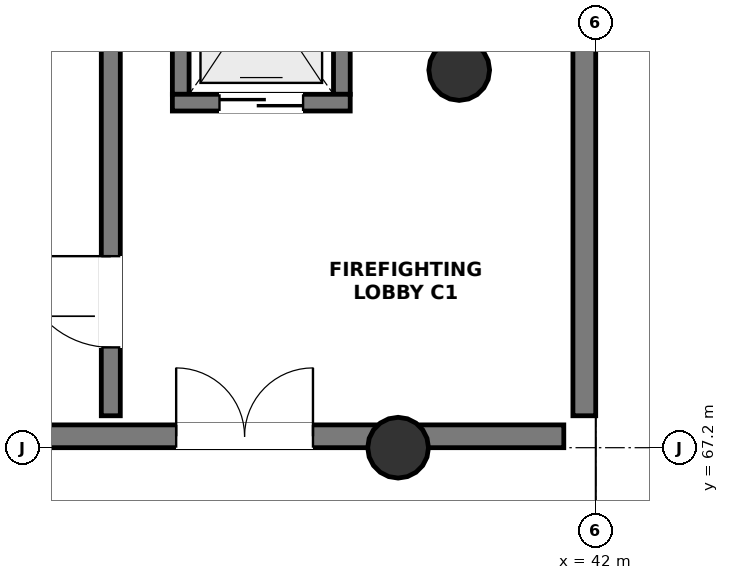
"""IFC4 building model, lengths in metres.
Left out: names, types, materials, properties, quantities, classifications, styles, units other than length and angle.
Written with IfcOpenShell. Run it as: python <this file> out.ifc"""

import sys

from ifc_helpers import new_model, si_unit, direction, frame, frame_2d, origin, origin_2d, place, context, subcontext, project, spatial, rectangle, circle, extrude, element, fill, save


model = new_model("IFC4")
c1 = context("Model", 3, precision=1e-05, world=origin(), true_north=direction((0.0, 1.0)))
c2 = subcontext(c1, "Body", "Model", "MODEL_VIEW")
j1 = project(units=[si_unit("LENGTHUNIT", "METRE"), si_unit("PLANEANGLEUNIT", "RADIAN")], contexts=[c1])
p1 = place(None, origin())
s1 = spatial("IfcSite", under=j1, at=p1, CompositionType="ELEMENT")
p2 = place(p1, origin())
s2 = spatial("IfcBuilding", under=s1, at=p2, CompositionType="ELEMENT")
p3 = place(p2, frame((0.0, 0.0, 9.9)))
s3 = spatial("IfcBuildingStorey", under=s2, at=p3, CompositionType="ELEMENT", Elevation=9.9)
for number, where, z_axis, x_axis in (
    (1, (40.204, 72.169, 0.0), (0.0, 0.0, 1.0), (1.0, 0.0, 0.0)),
    (2, (39.4, 67.2, 0.0), (0.0, 0.0, 1.0), (1.0, 0.0, 0.0)),
):
    element("IfcColumn", number, at=place(p3, frame(where, z_axis=z_axis, x_axis=x_axis)), inside=s3, PredefinedType="COLUMN", context=c2, shape_type="SweptSolid", body=[
        extrude(circle(Radius=0.4, at=origin_2d()), origin(), (0.0, 0.0, 1.0), 4.5),
    ])
p4 = place(p3, frame((25.62, 67.35, 0.0), z_axis=(0.0, 0.0, 1.0), x_axis=(1.0, 0.0, 0.0)))
e3 = element("IfcWall", 3, at=p4, inside=s3, PredefinedType="SHEAR", context=c2, shape_type="SweptSolid", body=[
    extrude(rectangle(XDim=15.96, YDim=0.3, at=frame_2d((7.98, 0.0))), origin(), (0.0, 0.0, 1.0), 4.22),
])
p5 = place(p4, frame((10.86, 0.0, 0.0)))
e4 = element("IfcOpeningElement", 4, at=p5, cuts=e3, PredefinedType="OPENING", context=c2, shape_type="SweptSolid", body=[
    extrude(rectangle(XDim=1.8, YDim=2.2, at=frame_2d((0.9, 1.1))), frame((0.0, 0.162, 0.0), z_axis=(0.0, -1.0, 0.0), x_axis=(1.0, 0.0, 0.0)), (0.0, 0.0, 1.0), 0.324),
])
p6 = place(p3, frame((41.85, 67.62, 0.0), z_axis=(0.0, 0.0, 1.0), x_axis=(0.0, 1.0, 0.0)))
e5 = element("IfcWall", 5, at=p6, inside=s3, PredefinedType="SHEAR", context=c2, shape_type="SweptSolid", body=[
    extrude(rectangle(XDim=7.56, YDim=0.3, at=frame_2d((3.78, 0.0))), origin(), (0.0, 0.0, 1.0), 4.22),
])
p7 = place(p3, frame((35.62, 67.62, 0.0), z_axis=(0.0, 0.0, 1.0), x_axis=(0.0, 1.0, 0.0)))
e6 = element("IfcWall", 6, at=p7, inside=s3, PredefinedType="SHEAR", context=c2, shape_type="SweptSolid", body=[
    extrude(rectangle(XDim=7.56, YDim=0.25, at=frame_2d((3.78, 0.0))), origin(), (0.0, 0.0, 1.0), 4.22),
])
p8 = place(p7, frame((0.9, 0.0, 0.0)))
e7 = element("IfcOpeningElement", 7, at=p8, cuts=e6, PredefinedType="OPENING", context=c2, shape_type="SweptSolid", body=[
    extrude(rectangle(XDim=1.2, YDim=2.2, at=frame_2d((0.6, 1.1))), frame((0.0, 0.137, 0.0), z_axis=(0.0, -1.0, 0.0), x_axis=(1.0, 0.0, 0.0)), (0.0, 0.0, 1.0), 0.274),
])
for number, where, z_axis, x_axis in (
    (8, (36.54, 71.85, 0.0), (0.0, 0.0, 1.0), (0.0, 1.0, 0.0)),
    (9, (38.66, 71.85, 0.0), (0.0, 0.0, 1.0), (0.0, 1.0, 0.0)),
):
    element("IfcWall", number, at=place(p3, frame(where, z_axis=z_axis, x_axis=x_axis)), inside=s3, PredefinedType="SOLIDWALL", context=c2, shape_type="SweptSolid", body=[
        extrude(rectangle(XDim=2.7, YDim=0.22, at=frame_2d((1.35, 0.0))), origin(), (0.0, 0.0, 1.0), 4.22),
    ])
p9 = place(p3, frame((36.43, 71.74, 0.0), z_axis=(0.0, 0.0, 1.0), x_axis=(1.0, 0.0, 0.0)))
e10 = element("IfcWall", 10, at=p9, inside=s3, PredefinedType="SOLIDWALL", context=c2, shape_type="SweptSolid", body=[
    extrude(rectangle(XDim=2.34, YDim=0.22, at=frame_2d((1.17, 0.0))), origin(), (0.0, 0.0, 1.0), 4.22),
])
p10 = place(p9, frame((0.62, 0.0, 0.0)))
e11 = element("IfcOpeningElement", 11, at=p10, cuts=e10, PredefinedType="OPENING", context=c2, shape_type="SweptSolid", body=[
    extrude(rectangle(XDim=1.1, YDim=2.15, at=frame_2d((0.55, 1.075))), frame((0.0, 0.122, 0.0), z_axis=(0.0, -1.0, 0.0), x_axis=(1.0, 0.0, 0.0)), (0.0, 0.0, 1.0), 0.244),
])
p11 = place(p5, origin())
e12 = element("IfcDoor", 12, at=p11, inside=s3, OperationType="DOUBLE_DOOR_SINGLE_SWING", PredefinedType="DOOR", context=c2, shape_type="SweptSolid", body=[
    extrude(rectangle(XDim=1.8, YDim=2.2, at=frame_2d((0.9, 1.1))), frame((0.0, 0.025, 0.0), z_axis=(0.0, -1.0, 0.0), x_axis=(1.0, 0.0, 0.0)), (0.0, 0.0, 1.0), 0.05),
])
fill(e4, e12)
p12 = place(p8, origin())
e13 = element("IfcDoor", 13, at=p12, inside=s3, OperationType="SINGLE_SWING_RIGHT", PredefinedType="DOOR", context=c2, shape_type="SweptSolid", body=[
    extrude(rectangle(XDim=1.2, YDim=2.2, at=frame_2d((0.6, 1.1))), frame((0.0, 0.025, 0.0), z_axis=(0.0, -1.0, 0.0), x_axis=(1.0, 0.0, 0.0)), (0.0, 0.0, 1.0), 0.05),
])
fill(e7, e13)
p13 = place(p10, origin())
e14 = element("IfcDoor", 14, at=p13, inside=s3, OperationType="DOUBLE_DOOR_SLIDING", PredefinedType="DOOR", context=c2, shape_type="SweptSolid", body=[
    extrude(rectangle(XDim=1.1, YDim=2.15, at=frame_2d((0.55, 1.075))), frame((0.0, 0.025, 0.0), z_axis=(0.0, -1.0, 0.0), x_axis=(1.0, 0.0, 0.0)), (0.0, 0.0, 1.0), 0.05),
])
fill(e11, e14)
save(model, sys.argv[1])
